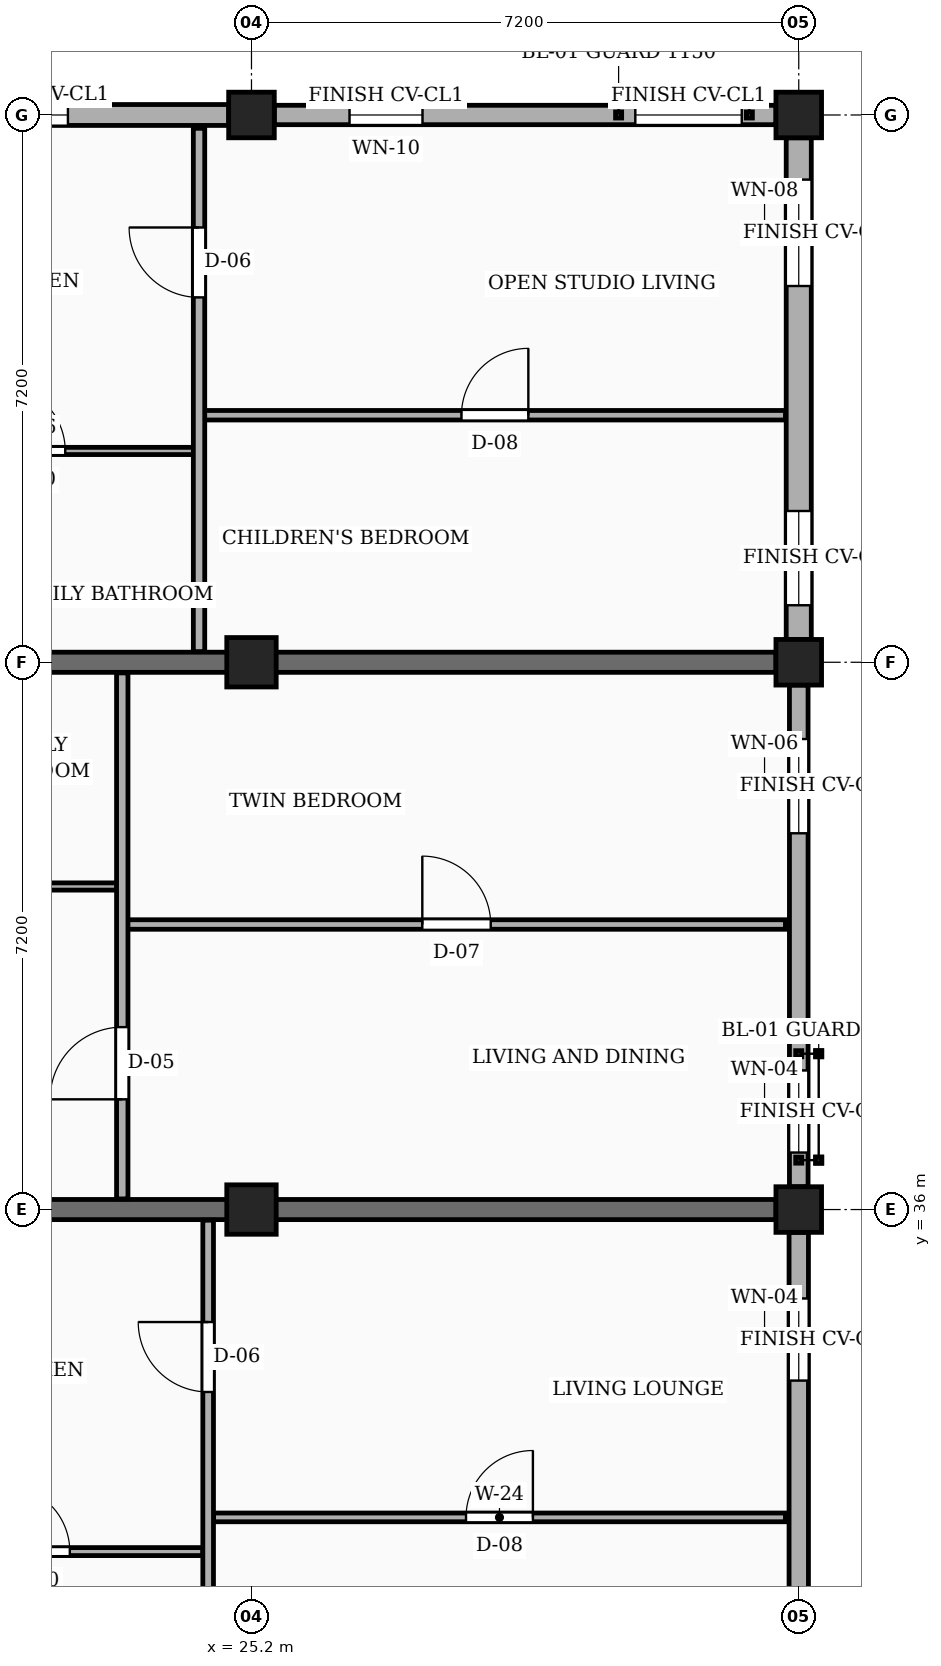
"""IFC4 building model, lengths in metres.
Left out: names, types, materials, properties, quantities, classifications, styles, units other than length and angle.
Written with IfcOpenShell. Run it as: python <this file> out.ifc"""

import sys

from ifc_helpers import new_model, si_unit, direction, frame, frame_2d, origin, origin_2d, place, context, subcontext, project, spatial, rectangle, extrude, element, fill, save


model = new_model("IFC4")
c1 = context("Model", 3, precision=1e-05, world=origin(), true_north=direction((0.0, 1.0)))
c2 = subcontext(c1, "Body", "Model", "MODEL_VIEW")
j1 = project(units=[si_unit("LENGTHUNIT", "METRE"), si_unit("PLANEANGLEUNIT", "RADIAN")], contexts=[c1])
p1 = place(None, origin())
s1 = spatial("IfcSite", under=j1, at=p1, CompositionType="ELEMENT")
p2 = place(p1, origin())
s2 = spatial("IfcBuilding", under=s1, at=p2, CompositionType="ELEMENT")
p3 = place(p2, frame((0.0, 0.0, 7.65)))
s3 = spatial("IfcBuildingStorey", under=s2, at=p3, CompositionType="ELEMENT", Elevation=7.65)
for number, where, z_axis, x_axis in (
    (1, (25.2, 36.0, 0.0), (0.0, 0.0, 1.0), (1.0, 0.0, 0.0)),
    (2, (25.2, 43.2, 0.0), (0.0, 0.0, 1.0), (1.0, 0.0, 0.0)),
):
    element("IfcColumn", number, at=place(p3, frame(where, z_axis=z_axis, x_axis=x_axis)), inside=s3, PredefinedType="COLUMN", context=c2, shape_type="SweptSolid", body=[
        extrude(rectangle(XDim=0.65, YDim=0.65, at=origin_2d()), origin(), (0.0, 0.0, 1.0), 3.15),
    ])
for number, where, z_axis, x_axis in (
    (3, (25.2, 50.4, 0.0), (0.0, 0.0, 1.0), (1.0, 0.0, 0.0)),
    (4, (32.4, 36.0, 0.0), (0.0, 0.0, 1.0), (1.0, 0.0, 0.0)),
    (5, (32.4, 43.2, 0.0), (0.0, 0.0, 1.0), (1.0, 0.0, 0.0)),
    (6, (32.4, 50.4, 0.0), (0.0, 0.0, 1.0), (1.0, 0.0, 0.0)),
):
    element("IfcColumn", number, at=place(p3, frame(where, z_axis=z_axis, x_axis=x_axis)), inside=s3, PredefinedType="COLUMN", context=c2, shape_type="SweptSolid", body=[
        extrude(rectangle(XDim=0.6, YDim=0.6, at=origin_2d()), origin(), (0.0, 0.0, 1.0), 3.15),
    ])
for number, where, z_axis, x_axis in (
    (7, (20.1, 36.0, 0.0), (0.0, 0.0, 1.0), (1.0, 0.0, 0.0)),
    (8, (20.1, 43.2, 0.0), (0.0, 0.0, 1.0), (1.0, 0.0, 0.0)),
):
    element("IfcWall", number, at=place(p3, frame(where, z_axis=z_axis, x_axis=x_axis)), inside=s3, PredefinedType="SOLIDWALL", context=c2, shape_type="SweptSolid", body=[
        extrude(rectangle(XDim=12.0, YDim=0.265, at=frame_2d((6.0, 0.0))), origin(), (0.0, 0.0, 1.0), 2.17),
    ])
p4 = place(p3, frame((32.4, 29.1, 0.0), z_axis=(0.0, 0.0, 1.0), x_axis=(0.0, 1.0, 0.0)))
e9 = element("IfcWall", 9, at=p4, inside=s3, PredefinedType="SOLIDWALL", context=c2, shape_type="SweptSolid", body=[
    extrude(rectangle(XDim=6.6, YDim=0.255, at=frame_2d((3.3, 0.0))), origin(), (0.0, 0.0, 1.0), 2.44),
])
p5 = place(p4, frame((0.45, 0.0, 0.78)))
e10 = element("IfcOpeningElement", 10, at=p5, cuts=e9, PredefinedType="OPENING", context=c2, shape_type="SweptSolid", body=[
    extrude(rectangle(XDim=0.92, YDim=1.15, at=frame_2d((0.46, 0.575))), frame((0.0, 0.137, 0.0), z_axis=(0.0, -1.0, 0.0), x_axis=(1.0, 0.0, 0.0)), (0.0, 0.0, 1.0), 0.275),
])
p6 = place(p4, frame((4.65, 0.0, 0.78)))
e11 = element("IfcOpeningElement", 11, at=p6, cuts=e9, PredefinedType="OPENING", context=c2, shape_type="SweptSolid", body=[
    extrude(rectangle(XDim=1.08, YDim=1.15, at=frame_2d((0.54, 0.575))), frame((0.0, 0.137, 0.0), z_axis=(0.0, -1.0, 0.0), x_axis=(1.0, 0.0, 0.0)), (0.0, 0.0, 1.0), 0.275),
])
p7 = place(p3, frame((32.4, 36.3, 0.0), z_axis=(0.0, 0.0, 1.0), x_axis=(0.0, 1.0, 0.0)))
e12 = element("IfcWall", 12, at=p7, inside=s3, PredefinedType="SOLIDWALL", context=c2, shape_type="SweptSolid", body=[
    extrude(rectangle(XDim=6.6, YDim=0.245, at=frame_2d((3.3, 0.0))), origin(), (0.0, 0.0, 1.0), 2.44),
])
p8 = place(p7, frame((0.45, 0.0, 0.78)))
e13 = element("IfcOpeningElement", 13, at=p8, cuts=e12, PredefinedType="OPENING", context=c2, shape_type="SweptSolid", body=[
    extrude(rectangle(XDim=1.08, YDim=1.15, at=frame_2d((0.54, 0.575))), frame((0.0, 0.133, 0.0), z_axis=(0.0, -1.0, 0.0), x_axis=(1.0, 0.0, 0.0)), (0.0, 0.0, 1.0), 0.265),
])
p9 = place(p7, frame((4.65, 0.0, 0.78)))
e14 = element("IfcOpeningElement", 14, at=p9, cuts=e12, PredefinedType="OPENING", context=c2, shape_type="SweptSolid", body=[
    extrude(rectangle(XDim=1.24, YDim=1.15, at=frame_2d((0.62, 0.575))), frame((0.0, 0.133, 0.0), z_axis=(0.0, -1.0, 0.0), x_axis=(1.0, 0.0, 0.0)), (0.0, 0.0, 1.0), 0.265),
])
p10 = place(p3, frame((32.4, 43.5, 0.0), z_axis=(0.0, 0.0, 1.0), x_axis=(0.0, 1.0, 0.0)))
e15 = element("IfcWall", 15, at=p10, inside=s3, PredefinedType="SOLIDWALL", context=c2, shape_type="SweptSolid", body=[
    extrude(rectangle(XDim=6.6, YDim=0.33, at=frame_2d((3.3, 0.0))), origin(), (0.0, 0.0, 1.0), 2.44),
])
p11 = place(p10, frame((0.45, 0.0, 0.78)))
e16 = element("IfcOpeningElement", 16, at=p11, cuts=e15, PredefinedType="OPENING", context=c2, shape_type="SweptSolid", body=[
    extrude(rectangle(XDim=1.24, YDim=1.15, at=frame_2d((0.62, 0.575))), frame((0.0, 0.175, 0.0), z_axis=(0.0, -1.0, 0.0), x_axis=(1.0, 0.0, 0.0)), (0.0, 0.0, 1.0), 0.35),
])
p12 = place(p10, frame((4.65, 0.0, 0.78)))
e17 = element("IfcOpeningElement", 17, at=p12, cuts=e15, PredefinedType="OPENING", context=c2, shape_type="SweptSolid", body=[
    extrude(rectangle(XDim=1.4, YDim=1.15, at=frame_2d((0.7, 0.575))), frame((0.0, 0.175, 0.0), z_axis=(0.0, -1.0, 0.0), x_axis=(1.0, 0.0, 0.0)), (0.0, 0.0, 1.0), 0.35),
])
p13 = place(p3, frame((32.1, 50.4, 0.0), z_axis=(0.0, 0.0, 1.0), x_axis=(-1.0, 0.0, 0.0)))
e18 = element("IfcWall", 18, at=p13, inside=s3, PredefinedType="SOLIDWALL", context=c2, shape_type="SweptSolid", body=[
    extrude(rectangle(XDim=6.6, YDim=0.255, at=frame_2d((3.3, 0.0))), origin(), (0.0, 0.0, 1.0), 2.44),
])
p14 = place(p13, frame((0.45, 0.0, 0.78)))
e19 = element("IfcOpeningElement", 19, at=p14, cuts=e18, PredefinedType="OPENING", context=c2, shape_type="SweptSolid", body=[
    extrude(rectangle(XDim=1.4, YDim=1.15, at=frame_2d((0.7, 0.575))), frame((0.0, 0.137, 0.0), z_axis=(0.0, -1.0, 0.0), x_axis=(1.0, 0.0, 0.0)), (0.0, 0.0, 1.0), 0.275),
])
p15 = place(p13, frame((4.65, 0.0, 0.78)))
e20 = element("IfcOpeningElement", 20, at=p15, cuts=e18, PredefinedType="OPENING", context=c2, shape_type="SweptSolid", body=[
    extrude(rectangle(XDim=0.96, YDim=1.26, at=frame_2d((0.48, 0.63))), frame((0.0, 0.137, 0.0), z_axis=(0.0, -1.0, 0.0), x_axis=(1.0, 0.0, 0.0)), (0.0, 0.0, 1.0), 0.275),
])
p16 = place(p3, frame((24.9, 50.4, 0.0), z_axis=(0.0, 0.0, 1.0), x_axis=(-1.0, 0.0, 0.0)))
e21 = element("IfcWall", 21, at=p16, inside=s3, PredefinedType="SOLIDWALL", context=c2, shape_type="SweptSolid", body=[
    extrude(rectangle(XDim=6.6, YDim=0.275, at=frame_2d((3.3, 0.0))), origin(), (0.0, 0.0, 1.0), 2.44),
])
p17 = place(p16, frame((2.115, 0.0, 0.78)))
e22 = element("IfcOpeningElement", 22, at=p17, cuts=e21, PredefinedType="OPENING", context=c2, shape_type="SweptSolid", body=[
    extrude(rectangle(XDim=0.96, YDim=1.26, at=frame_2d((0.48, 0.63))), frame((0.0, 0.147, 0.0), z_axis=(0.0, -1.0, 0.0), x_axis=(1.0, 0.0, 0.0)), (0.0, 0.0, 1.0), 0.295),
])
p18 = place(p16, frame((5.07, 0.0, 0.78)))
e23 = element("IfcOpeningElement", 23, at=p18, cuts=e21, PredefinedType="OPENING", context=c2, shape_type="SweptSolid", body=[
    extrude(rectangle(XDim=1.12, YDim=1.26, at=frame_2d((0.56, 0.63))), frame((0.0, 0.147, 0.0), z_axis=(0.0, -1.0, 0.0), x_axis=(1.0, 0.0, 0.0)), (0.0, 0.0, 1.0), 0.295),
])
p19 = place(p3, frame((24.7, 31.95, 0.0), z_axis=(0.0, 0.0, 1.0), x_axis=(1.0, 0.0, 0.0)))
e24 = element("IfcWall", 24, at=p19, inside=s3, PredefinedType="PARTITIONING", context=c2, shape_type="SweptSolid", body=[
    extrude(rectangle(XDim=7.525, YDim=0.115, at=frame_2d((3.763, 0.0))), origin(), (0.0, 0.0, 1.0), 2.305),
])
p20 = place(p19, frame((3.323, 0.0, 0.0)))
e25 = element("IfcOpeningElement", 25, at=p20, cuts=e24, PredefinedType="OPENING", context=c2, shape_type="SweptSolid", body=[
    extrude(rectangle(XDim=0.88, YDim=2.08, at=frame_2d((0.44, 1.04))), frame((0.0, 0.067, 0.0), z_axis=(0.0, -1.0, 0.0), x_axis=(1.0, 0.0, 0.0)), (0.0, 0.0, 1.0), 0.135),
])
p21 = place(p3, frame((20.19, 31.5, 0.0), z_axis=(0.0, 0.0, 1.0), x_axis=(1.0, 0.0, 0.0)))
e26 = element("IfcWall", 26, at=p21, inside=s3, PredefinedType="PARTITIONING", context=c2, shape_type="SweptSolid", body=[
    extrude(rectangle(XDim=4.37, YDim=0.105, at=frame_2d((2.185, 0.0))), origin(), (0.0, 0.0, 1.0), 2.305),
])
p22 = place(p21, frame((1.75, 0.0, 0.0)))
e27 = element("IfcOpeningElement", 27, at=p22, cuts=e26, PredefinedType="OPENING", context=c2, shape_type="SweptSolid", body=[
    extrude(rectangle(XDim=0.87, YDim=2.05, at=frame_2d((0.435, 1.025))), frame((0.0, 0.062, 0.0), z_axis=(0.0, -1.0, 0.0), x_axis=(1.0, 0.0, 0.0)), (0.0, 0.0, 1.0), 0.125),
])
p23 = place(p3, frame((24.63, 28.94, 0.0), z_axis=(0.0, 0.0, 1.0), x_axis=(0.0, 1.0, 0.0)))
e28 = element("IfcWall", 28, at=p23, inside=s3, PredefinedType="PARTITIONING", context=c2, shape_type="SweptSolid", body=[
    extrude(rectangle(XDim=6.92, YDim=0.14, at=frame_2d((3.46, 0.0))), origin(), (0.0, 0.0, 1.0), 2.305),
])
p24 = place(p23, frame((4.66, 0.0, 0.0)))
e29 = element("IfcOpeningElement", 29, at=p24, cuts=e28, PredefinedType="OPENING", context=c2, shape_type="SweptSolid", body=[
    extrude(rectangle(XDim=0.92, YDim=2.1, at=frame_2d((0.46, 1.05))), frame((0.0, 0.08, 0.0), z_axis=(0.0, -1.0, 0.0), x_axis=(1.0, 0.0, 0.0)), (0.0, 0.0, 1.0), 0.16),
])
p25 = place(p3, frame((23.57, 39.75, 0.0), z_axis=(0.0, 0.0, 1.0), x_axis=(1.0, 0.0, 0.0)))
e30 = element("IfcWall", 30, at=p25, inside=s3, PredefinedType="PARTITIONING", context=c2, shape_type="SweptSolid", body=[
    extrude(rectangle(XDim=8.655, YDim=0.125, at=frame_2d((4.328, 0.0))), origin(), (0.0, 0.0, 1.0), 2.305),
])
p26 = place(p25, frame((3.877, 0.0, 0.0)))
e31 = element("IfcOpeningElement", 31, at=p26, cuts=e30, PredefinedType="OPENING", context=c2, shape_type="SweptSolid", body=[
    extrude(rectangle(XDim=0.9, YDim=2.1, at=frame_2d((0.45, 1.05))), frame((0.0, 0.073, 0.0), z_axis=(0.0, -1.0, 0.0), x_axis=(1.0, 0.0, 0.0)), (0.0, 0.0, 1.0), 0.145),
])
p27 = place(p3, frame((20.19, 40.25, 0.0), z_axis=(0.0, 0.0, 1.0), x_axis=(1.0, 0.0, 0.0)))
e32 = element("IfcWall", 32, at=p27, inside=s3, PredefinedType="PARTITIONING", context=c2, shape_type="SweptSolid", body=[
    extrude(rectangle(XDim=3.24, YDim=0.095, at=frame_2d((1.62, 0.0))), origin(), (0.0, 0.0, 1.0), 2.305),
])
p28 = place(p27, frame((1.17, 0.0, 0.0)))
e33 = element("IfcOpeningElement", 33, at=p28, cuts=e32, PredefinedType="OPENING", context=c2, shape_type="SweptSolid", body=[
    extrude(rectangle(XDim=0.9, YDim=2.05, at=frame_2d((0.45, 1.025))), frame((0.0, 0.058, 0.0), z_axis=(0.0, -1.0, 0.0), x_axis=(1.0, 0.0, 0.0)), (0.0, 0.0, 1.0), 0.115),
])
p29 = place(p3, frame((23.5, 36.14, 0.0), z_axis=(0.0, 0.0, 1.0), x_axis=(0.0, 1.0, 0.0)))
e34 = element("IfcWall", 34, at=p29, inside=s3, PredefinedType="PARTITIONING", context=c2, shape_type="SweptSolid", body=[
    extrude(rectangle(XDim=6.92, YDim=0.15, at=frame_2d((3.46, 0.0))), origin(), (0.0, 0.0, 1.0), 2.305),
])
p30 = place(p29, frame((1.31, 0.0, 0.0)))
e35 = element("IfcOpeningElement", 35, at=p30, cuts=e34, PredefinedType="OPENING", context=c2, shape_type="SweptSolid", body=[
    extrude(rectangle(XDim=0.95, YDim=2.1, at=frame_2d((0.475, 1.05))), frame((0.0, 0.085, 0.0), z_axis=(0.0, -1.0, 0.0), x_axis=(1.0, 0.0, 0.0)), (0.0, 0.0, 1.0), 0.17),
])
p31 = place(p3, frame((24.58, 46.45, 0.0), z_axis=(0.0, 0.0, 1.0), x_axis=(1.0, 0.0, 0.0)))
e36 = element("IfcWall", 36, at=p31, inside=s3, PredefinedType="PARTITIONING", context=c2, shape_type="SweptSolid", body=[
    extrude(rectangle(XDim=7.645, YDim=0.125, at=frame_2d((3.823, 0.0))), origin(), (0.0, 0.0, 1.0), 2.305),
])
p32 = place(p31, frame((3.383, 0.0, 0.0)))
e37 = element("IfcOpeningElement", 37, at=p32, cuts=e36, PredefinedType="OPENING", context=c2, shape_type="SweptSolid", body=[
    extrude(rectangle(XDim=0.88, YDim=2.08, at=frame_2d((0.44, 1.04))), frame((0.0, 0.073, 0.0), z_axis=(0.0, -1.0, 0.0), x_axis=(1.0, 0.0, 0.0)), (0.0, 0.0, 1.0), 0.145),
])
p33 = place(p3, frame((20.19, 45.98, 0.0), z_axis=(0.0, 0.0, 1.0), x_axis=(1.0, 0.0, 0.0)))
e38 = element("IfcWall", 38, at=p33, inside=s3, PredefinedType="PARTITIONING", context=c2, shape_type="SweptSolid", body=[
    extrude(rectangle(XDim=4.25, YDim=0.095, at=frame_2d((2.125, 0.0))), origin(), (0.0, 0.0, 1.0), 2.305),
])
p34 = place(p33, frame((1.69, 0.0, 0.0)))
e39 = element("IfcOpeningElement", 39, at=p34, cuts=e38, PredefinedType="OPENING", context=c2, shape_type="SweptSolid", body=[
    extrude(rectangle(XDim=0.87, YDim=2.05, at=frame_2d((0.435, 1.025))), frame((0.0, 0.058, 0.0), z_axis=(0.0, -1.0, 0.0), x_axis=(1.0, 0.0, 0.0)), (0.0, 0.0, 1.0), 0.115),
])
p35 = place(p3, frame((24.51, 43.34, 0.0), z_axis=(0.0, 0.0, 1.0), x_axis=(0.0, 1.0, 0.0)))
e40 = element("IfcWall", 40, at=p35, inside=s3, PredefinedType="PARTITIONING", context=c2, shape_type="SweptSolid", body=[
    extrude(rectangle(XDim=6.885, YDim=0.15, at=frame_2d((3.442, 0.0))), origin(), (0.0, 0.0, 1.0), 2.305),
])
p36 = place(p35, frame((4.66, 0.0, 0.0)))
e41 = element("IfcOpeningElement", 41, at=p36, cuts=e40, PredefinedType="OPENING", context=c2, shape_type="SweptSolid", body=[
    extrude(rectangle(XDim=0.92, YDim=2.1, at=frame_2d((0.46, 1.05))), frame((0.0, 0.085, 0.0), z_axis=(0.0, -1.0, 0.0), x_axis=(1.0, 0.0, 0.0)), (0.0, 0.0, 1.0), 0.17),
])
p37 = place(p6, origin())
e42 = element("IfcWindow", 42, at=p37, inside=s3, PartitioningType="SINGLE_PANEL", PredefinedType="WINDOW", context=c2, shape_type="SweptSolid", body=[
    extrude(rectangle(XDim=1.08, YDim=1.15, at=frame_2d((0.54, 0.575))), frame((0.0, 0.03, 0.0), z_axis=(0.0, -1.0, 0.0), x_axis=(1.0, 0.0, 0.0)), (0.0, 0.0, 1.0), 0.06),
])
fill(e11, e42)
p38 = place(p8, origin())
e43 = element("IfcWindow", 43, at=p38, inside=s3, PartitioningType="SINGLE_PANEL", PredefinedType="WINDOW", context=c2, shape_type="SweptSolid", body=[
    extrude(rectangle(XDim=1.08, YDim=1.15, at=frame_2d((0.54, 0.575))), frame((0.0, 0.03, 0.0), z_axis=(0.0, -1.0, 0.0), x_axis=(1.0, 0.0, 0.0)), (0.0, 0.0, 1.0), 0.06),
])
fill(e13, e43)
p39 = place(p9, origin())
e44 = element("IfcWindow", 44, at=p39, inside=s3, PartitioningType="SINGLE_PANEL", PredefinedType="WINDOW", context=c2, shape_type="SweptSolid", body=[
    extrude(rectangle(XDim=1.24, YDim=1.15, at=frame_2d((0.62, 0.575))), frame((0.0, 0.03, 0.0), z_axis=(0.0, -1.0, 0.0), x_axis=(1.0, 0.0, 0.0)), (0.0, 0.0, 1.0), 0.06),
])
fill(e14, e44)
p40 = place(p11, origin())
e45 = element("IfcWindow", 45, at=p40, inside=s3, PartitioningType="SINGLE_PANEL", PredefinedType="WINDOW", context=c2, shape_type="SweptSolid", body=[
    extrude(rectangle(XDim=1.24, YDim=1.15, at=frame_2d((0.62, 0.575))), frame((0.0, 0.03, 0.0), z_axis=(0.0, -1.0, 0.0), x_axis=(1.0, 0.0, 0.0)), (0.0, 0.0, 1.0), 0.06),
])
fill(e16, e45)
p41 = place(p12, origin())
e46 = element("IfcWindow", 46, at=p41, inside=s3, PartitioningType="SINGLE_PANEL", PredefinedType="WINDOW", context=c2, shape_type="SweptSolid", body=[
    extrude(rectangle(XDim=1.4, YDim=1.15, at=frame_2d((0.7, 0.575))), frame((0.0, 0.03, 0.0), z_axis=(0.0, -1.0, 0.0), x_axis=(1.0, 0.0, 0.0)), (0.0, 0.0, 1.0), 0.06),
])
fill(e17, e46)
p42 = place(p14, origin())
e47 = element("IfcWindow", 47, at=p42, inside=s3, PartitioningType="SINGLE_PANEL", PredefinedType="WINDOW", context=c2, shape_type="SweptSolid", body=[
    extrude(rectangle(XDim=1.4, YDim=1.15, at=frame_2d((0.7, 0.575))), frame((0.0, 0.03, 0.0), z_axis=(0.0, -1.0, 0.0), x_axis=(1.0, 0.0, 0.0)), (0.0, 0.0, 1.0), 0.06),
])
fill(e19, e47)
p43 = place(p15, origin())
e48 = element("IfcWindow", 48, at=p43, inside=s3, PartitioningType="SINGLE_PANEL", PredefinedType="WINDOW", context=c2, shape_type="SweptSolid", body=[
    extrude(rectangle(XDim=0.96, YDim=1.26, at=frame_2d((0.48, 0.63))), frame((0.0, 0.03, 0.0), z_axis=(0.0, -1.0, 0.0), x_axis=(1.0, 0.0, 0.0)), (0.0, 0.0, 1.0), 0.06),
])
fill(e20, e48)
p44 = place(p17, origin())
e49 = element("IfcWindow", 49, at=p44, inside=s3, PartitioningType="SINGLE_PANEL", PredefinedType="WINDOW", context=c2, shape_type="SweptSolid", body=[
    extrude(rectangle(XDim=0.96, YDim=1.26, at=frame_2d((0.48, 0.63))), frame((0.0, 0.03, 0.0), z_axis=(0.0, -1.0, 0.0), x_axis=(1.0, 0.0, 0.0)), (0.0, 0.0, 1.0), 0.06),
])
fill(e22, e49)
p45 = place(p20, origin())
e50 = element("IfcDoor", 50, at=p45, inside=s3, OperationType="SINGLE_SWING_RIGHT", PredefinedType="DOOR", context=c2, shape_type="SweptSolid", body=[
    extrude(rectangle(XDim=0.88, YDim=2.08, at=frame_2d((0.44, 1.04))), frame((0.0, 0.025, 0.0), z_axis=(0.0, -1.0, 0.0), x_axis=(1.0, 0.0, 0.0)), (0.0, 0.0, 1.0), 0.05),
])
fill(e25, e50)
p46 = place(p22, origin())
e51 = element("IfcDoor", 51, at=p46, inside=s3, OperationType="SINGLE_SWING_LEFT", PredefinedType="DOOR", context=c2, shape_type="SweptSolid", body=[
    extrude(rectangle(XDim=0.87, YDim=2.05, at=frame_2d((0.435, 1.025))), frame((0.0, 0.025, 0.0), z_axis=(0.0, -1.0, 0.0), x_axis=(1.0, 0.0, 0.0)), (0.0, 0.0, 1.0), 0.05),
])
fill(e27, e51)
p47 = place(p24, origin())
e52 = element("IfcDoor", 52, at=p47, inside=s3, OperationType="SINGLE_SWING_RIGHT", PredefinedType="DOOR", context=c2, shape_type="SweptSolid", body=[
    extrude(rectangle(XDim=0.92, YDim=2.1, at=frame_2d((0.46, 1.05))), frame((0.0, 0.025, 0.0), z_axis=(0.0, -1.0, 0.0), x_axis=(1.0, 0.0, 0.0)), (0.0, 0.0, 1.0), 0.05),
])
fill(e29, e52)
p48 = place(p26, origin())
e53 = element("IfcDoor", 53, at=p48, inside=s3, OperationType="SINGLE_SWING_LEFT", PredefinedType="DOOR", context=c2, shape_type="SweptSolid", body=[
    extrude(rectangle(XDim=0.9, YDim=2.1, at=frame_2d((0.45, 1.05))), frame((0.0, 0.025, 0.0), z_axis=(0.0, -1.0, 0.0), x_axis=(1.0, 0.0, 0.0)), (0.0, 0.0, 1.0), 0.05),
])
fill(e31, e53)
p49 = place(p30, origin())
e54 = element("IfcDoor", 54, at=p49, inside=s3, OperationType="SINGLE_SWING_LEFT", PredefinedType="DOOR", context=c2, shape_type="SweptSolid", body=[
    extrude(rectangle(XDim=0.95, YDim=2.1, at=frame_2d((0.475, 1.05))), frame((0.0, 0.025, 0.0), z_axis=(0.0, -1.0, 0.0), x_axis=(1.0, 0.0, 0.0)), (0.0, 0.0, 1.0), 0.05),
])
fill(e35, e54)
p50 = place(p32, origin())
e55 = element("IfcDoor", 55, at=p50, inside=s3, OperationType="SINGLE_SWING_RIGHT", PredefinedType="DOOR", context=c2, shape_type="SweptSolid", body=[
    extrude(rectangle(XDim=0.88, YDim=2.08, at=frame_2d((0.44, 1.04))), frame((0.0, 0.025, 0.0), z_axis=(0.0, -1.0, 0.0), x_axis=(1.0, 0.0, 0.0)), (0.0, 0.0, 1.0), 0.05),
])
fill(e37, e55)
p51 = place(p34, origin())
e56 = element("IfcDoor", 56, at=p51, inside=s3, OperationType="SINGLE_SWING_LEFT", PredefinedType="DOOR", context=c2, shape_type="SweptSolid", body=[
    extrude(rectangle(XDim=0.87, YDim=2.05, at=frame_2d((0.435, 1.025))), frame((0.0, 0.025, 0.0), z_axis=(0.0, -1.0, 0.0), x_axis=(1.0, 0.0, 0.0)), (0.0, 0.0, 1.0), 0.05),
])
fill(e39, e56)
p52 = place(p36, origin())
e57 = element("IfcDoor", 57, at=p52, inside=s3, OperationType="SINGLE_SWING_RIGHT", PredefinedType="DOOR", context=c2, shape_type="SweptSolid", body=[
    extrude(rectangle(XDim=0.92, YDim=2.1, at=frame_2d((0.46, 1.05))), frame((0.0, 0.025, 0.0), z_axis=(0.0, -1.0, 0.0), x_axis=(1.0, 0.0, 0.0)), (0.0, 0.0, 1.0), 0.05),
])
fill(e41, e57)
save(model, sys.argv[1])
